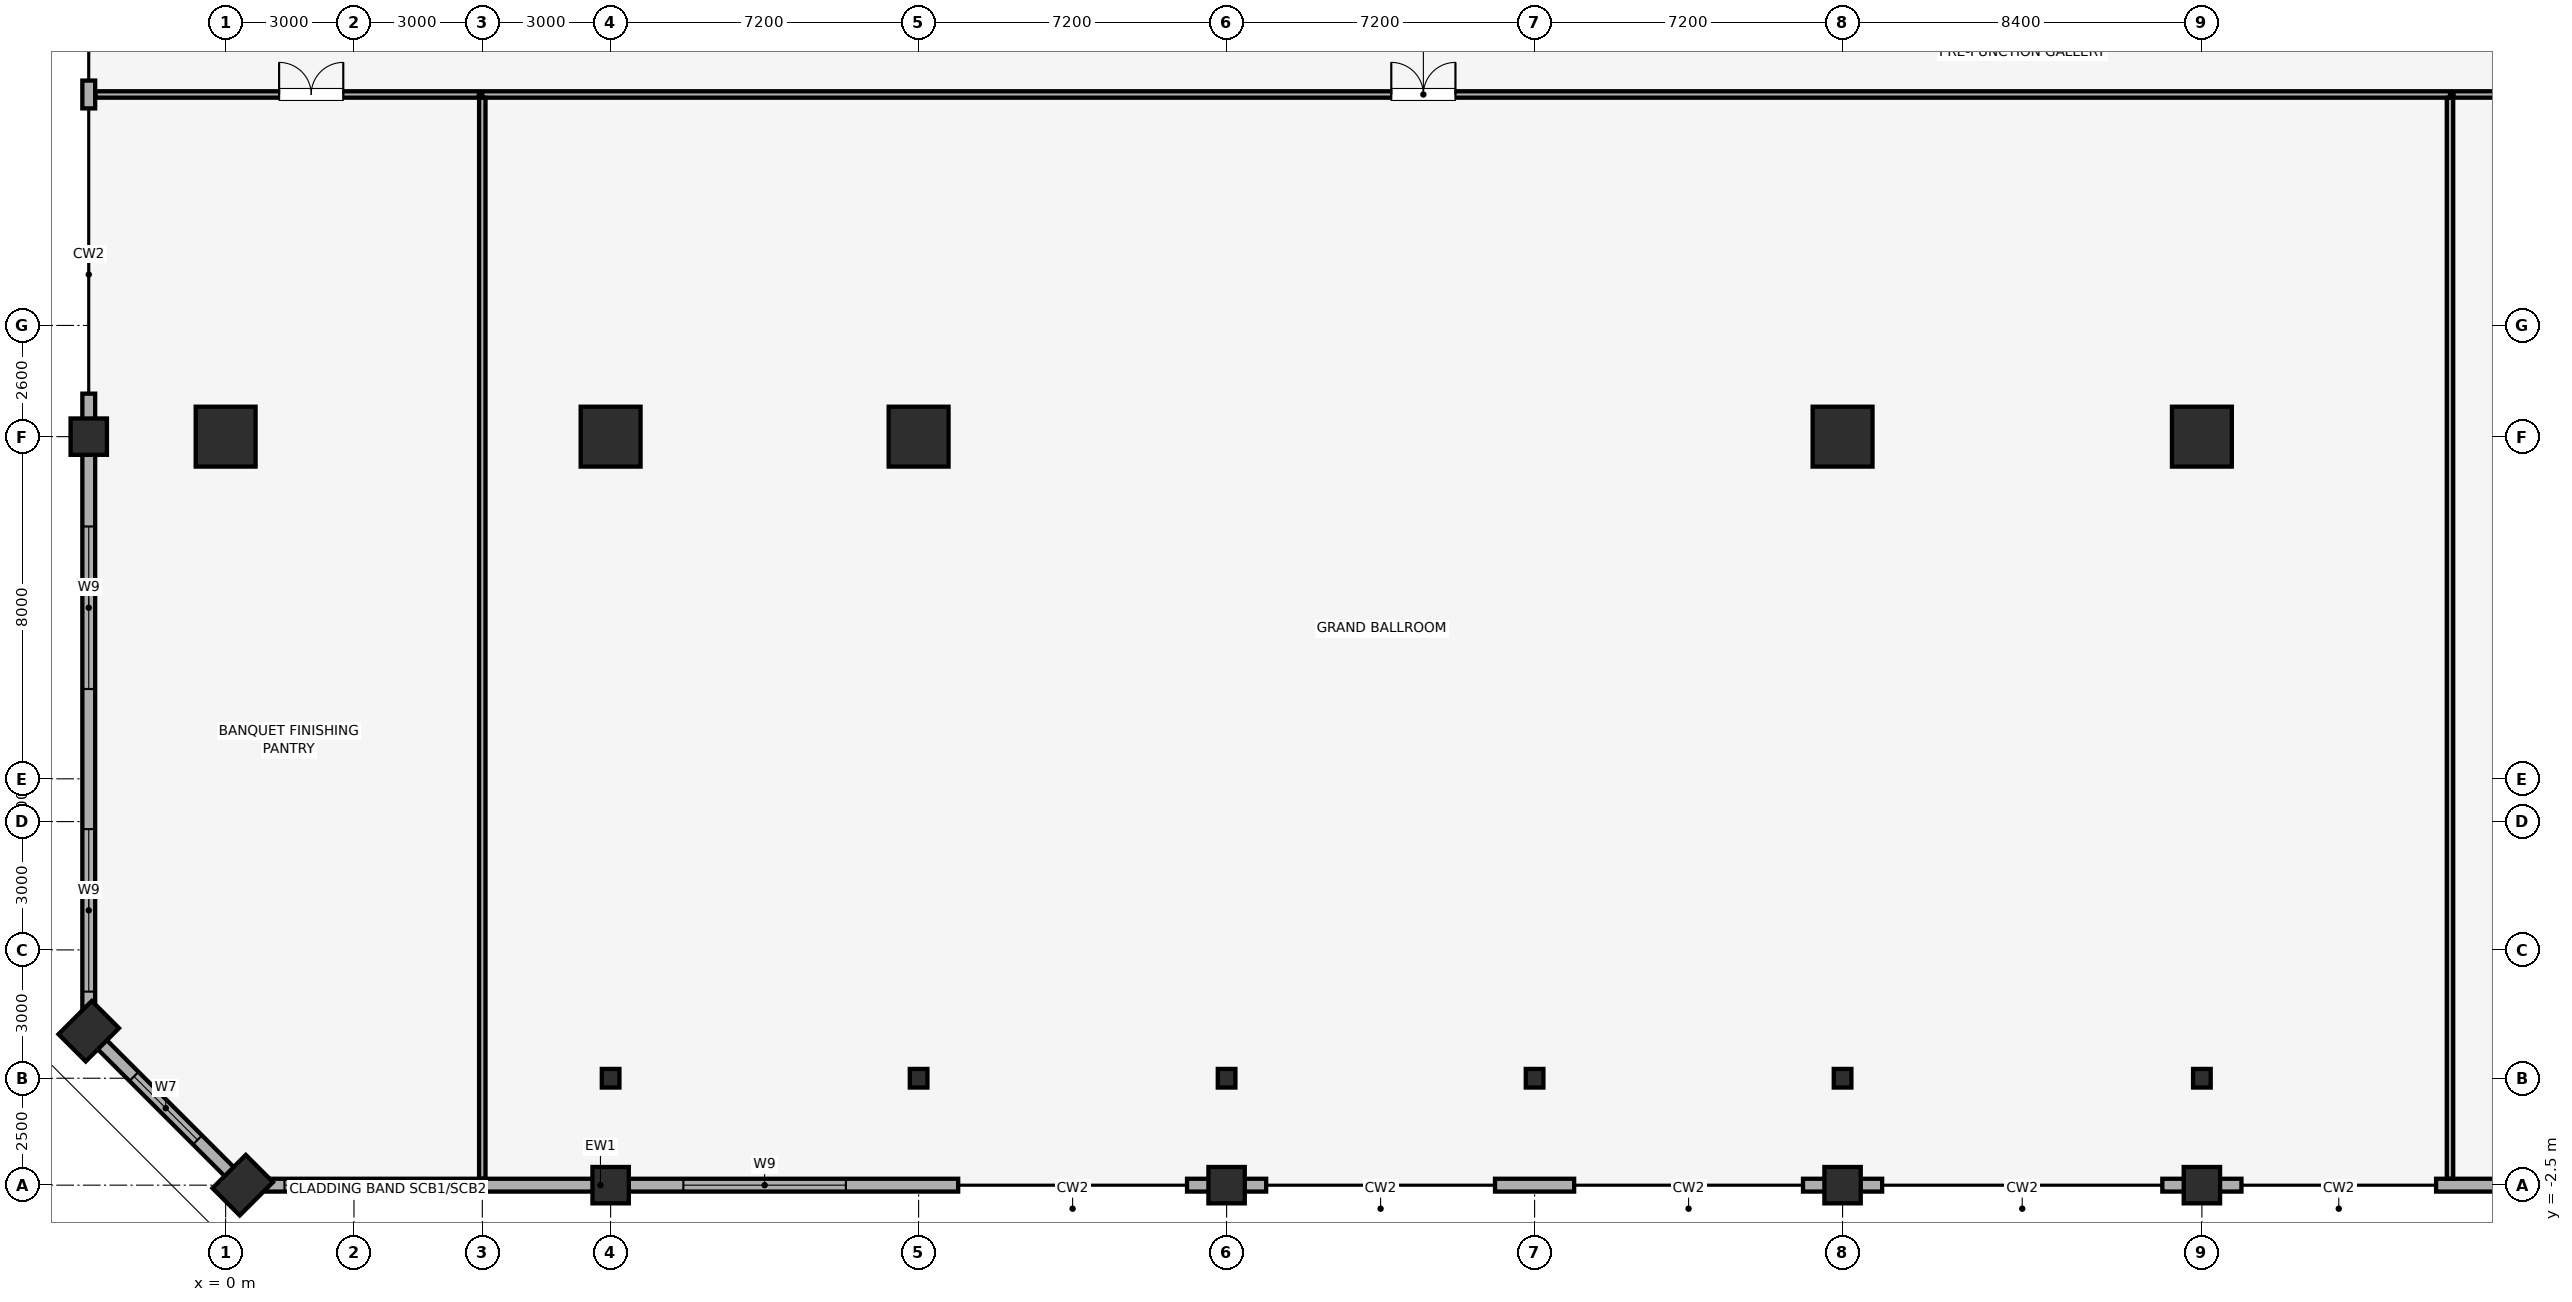
"""IFC4 building model, lengths in metres.
Left out: names, types, materials, properties, quantities, classifications, styles, units other than length and angle.
Written with IfcOpenShell. Run it as: python <this file> out.ifc"""

import sys

from ifc_helpers import new_model, si_unit, direction, frame, frame_2d, origin, origin_2d, place, context, subcontext, project, spatial, rectangle, i_section, extrude, element, fill, save


model = new_model("IFC4")
c1 = context("Model", 3, precision=1e-05, world=origin(), true_north=direction((0.0, 1.0)))
c2 = subcontext(c1, "Body", "Model", "MODEL_VIEW")
j1 = project(units=[si_unit("LENGTHUNIT", "METRE"), si_unit("PLANEANGLEUNIT", "RADIAN")], contexts=[c1])
p1 = place(None, origin())
s1 = spatial("IfcSite", under=j1, at=p1, CompositionType="ELEMENT")
p2 = place(p1, origin())
s2 = spatial("IfcBuilding", under=s1, at=p2, CompositionType="ELEMENT")
p3 = place(p2, frame((0.0, 0.0, 19.4)))
s3 = spatial("IfcBuildingStorey", under=s2, at=p3, CompositionType="ELEMENT", Elevation=19.4)
for number, where, z_axis, x_axis in (
    (1, (9.0, -2.5, 0.0), (0.0, 0.0, 1.0), (1.0, 0.0, 0.0)),
    (2, (23.4, -2.5, 0.0), (0.0, 0.0, 1.0), (1.0, 0.0, 0.0)),
    (3, (37.8, -2.5, 0.0), (0.0, 0.0, 1.0), (1.0, 0.0, 0.0)),
    (4, (46.2, -2.5, 0.0), (0.0, 0.0, 1.0), (1.0, 0.0, 0.0)),
    (5, (-3.2, 15.0, 0.0), (0.0, 0.0, 1.0), (1.0, 0.0, 0.0)),
):
    element("IfcColumn", number, at=place(p3, frame(where, z_axis=z_axis, x_axis=x_axis)), inside=s3, PredefinedType="COLUMN", context=c2, shape_type="SweptSolid", body=[
        extrude(rectangle(XDim=0.85, YDim=0.85, at=origin_2d()), origin(), (0.0, 0.0, 1.0), 6.28),
    ])
for number, where, z_axis, x_axis in (
    (6, (0.4, -2.5, 0.0), (0.0, 0.0, 1.0), (0.707, 0.707, 0.0)),
    (7, (-3.2, 1.1, 0.0), (0.0, 0.0, 1.0), (0.707, 0.707, 0.0)),
):
    element("IfcColumn", number, at=place(p3, frame(where, z_axis=z_axis, x_axis=x_axis)), inside=s3, PredefinedType="PILASTER", context=c2, shape_type="SweptSolid", body=[
        extrude(rectangle(XDim=1.1, YDim=0.9, at=origin_2d()), origin(), (0.0, 0.0, 1.0), 6.28),
    ])
for number, where, z_axis, x_axis in (
    (8, (9.0, 0.0, 0.0), (0.0, 0.0, 1.0), (1.0, 0.0, 0.0)),
    (9, (16.2, 0.0, 0.0), (0.0, 0.0, 1.0), (1.0, 0.0, 0.0)),
    (10, (23.4, 0.0, 0.0), (0.0, 0.0, 1.0), (1.0, 0.0, 0.0)),
    (11, (30.6, 0.0, 0.0), (0.0, 0.0, 1.0), (1.0, 0.0, 0.0)),
    (12, (37.8, 0.0, 0.0), (0.0, 0.0, 1.0), (1.0, 0.0, 0.0)),
    (13, (46.2, 0.0, 0.0), (0.0, 0.0, 1.0), (1.0, 0.0, 0.0)),
):
    element("IfcColumn", number, at=place(p3, frame(where, z_axis=z_axis, x_axis=x_axis)), inside=s3, PredefinedType="COLUMN", context=c2, shape_type="SweptSolid", body=[
        extrude(i_section(OverallWidth=0.412, OverallDepth=0.435, WebThickness=0.036, FlangeThickness=0.056, FilletRadius=0.015, at=origin_2d()), origin(), (0.0, 0.0, 1.0), 6.28),
    ])
for number, where, z_axis, x_axis in (
    (14, (9.0, 15.0, 0.0), (0.0, 0.0, 1.0), (1.0, 0.0, 0.0)),
    (15, (37.8, 15.0, 0.0), (0.0, 0.0, 1.0), (1.0, 0.0, 0.0)),
    (16, (46.2, 15.0, 0.0), (0.0, 0.0, 1.0), (1.0, 0.0, 0.0)),
    (17, (16.2, 15.0, 0.0), (0.0, 0.0, 1.0), (1.0, 0.0, 0.0)),
    (18, (0.0, 15.0, 0.0), (0.0, 0.0, 1.0), (1.0, 0.0, 0.0)),
):
    element("IfcColumn", number, at=place(p3, frame(where, z_axis=z_axis, x_axis=x_axis)), inside=s3, PredefinedType="COLUMN", context=c2, shape_type="SweptSolid", body=[
        extrude(rectangle(XDim=1.4, YDim=1.4, at=origin_2d()), origin(), (0.0, 0.0, 1.0), 6.28),
    ])
p4 = place(p3, frame((0.4, -2.5, 0.0), z_axis=(0.0, 0.0, 1.0), x_axis=(1.0, 0.0, 0.0)))
e19 = element("IfcWall", 19, at=p4, inside=s3, PredefinedType="SOLIDWALL", context=c2, shape_type="SweptSolid", body=[
    extrude(rectangle(XDim=16.725, YDim=0.3, at=frame_2d((8.363, 0.0))), origin(), (0.0, 0.0, 1.0), 5.33),
])
p5 = place(p4, frame((0.975, 0.0, 0.85)))
e20 = element("IfcOpeningElement", 20, at=p5, cuts=e19, PredefinedType="OPENING", context=c2, shape_type="SweptSolid", body=[
    extrude(rectangle(XDim=3.8, YDim=2.2, at=frame_2d((1.9, 1.1))), frame((0.0, 0.16, 0.0), z_axis=(0.0, -1.0, 0.0), x_axis=(1.0, 0.0, 0.0)), (0.0, 0.0, 1.0), 0.32),
])
p6 = place(p4, frame((10.3, 0.0, 0.85)))
e21 = element("IfcOpeningElement", 21, at=p6, cuts=e19, PredefinedType="OPENING", context=c2, shape_type="SweptSolid", body=[
    extrude(rectangle(XDim=3.8, YDim=2.2, at=frame_2d((1.9, 1.1))), frame((0.0, 0.16, 0.0), z_axis=(0.0, -1.0, 0.0), x_axis=(1.0, 0.0, 0.0)), (0.0, 0.0, 1.0), 0.32),
])
for number, where, z_axis, x_axis in (
    (22, (22.475, -2.5, 0.0), (0.0, 0.0, 1.0), (1.0, 0.0, 0.0)),
    (23, (29.675, -2.5, 0.0), (0.0, 0.0, 1.0), (1.0, 0.0, 0.0)),
):
    element("IfcWall", number, at=place(p3, frame(where, z_axis=z_axis, x_axis=x_axis)), inside=s3, PredefinedType="SOLIDWALL", context=c2, shape_type="SweptSolid", body=[
        extrude(rectangle(XDim=1.85, YDim=0.3, at=frame_2d((0.925, 0.0))), origin(), (0.0, 0.0, 1.0), 5.33),
    ])
for number, where, z_axis, x_axis in (
    (24, (36.875, -2.5, 0.0), (0.0, 0.0, 1.0), (1.0, 0.0, 0.0)),
    (25, (45.275, -2.5, 0.0), (0.0, 0.0, 1.0), (1.0, 0.0, 0.0)),
):
    element("IfcWall", number, at=place(p3, frame(where, z_axis=z_axis, x_axis=x_axis)), inside=s3, PredefinedType="SOLIDWALL", context=c2, shape_type="SweptSolid", body=[
        extrude(rectangle(XDim=1.85, YDim=0.3, at=frame_2d((0.925, 0.0))), origin(), (0.0, 0.0, 1.0), 5.33),
    ])
p7 = place(p3, frame((51.675, -2.5, 0.0), z_axis=(0.0, 0.0, 1.0), x_axis=(1.0, 0.0, 0.0)))
e26 = element("IfcWall", 26, at=p7, inside=s3, PredefinedType="SOLIDWALL", context=c2, shape_type="SweptSolid", body=[
    extrude(rectangle(XDim=2.65, YDim=0.3, at=frame_2d((1.325, 0.0))), origin(), (0.0, 0.0, 1.0), 5.33),
])
p8 = place(p3, frame((-3.2, 23.325, 0.0), z_axis=(0.0, 0.0, 1.0), x_axis=(0.0, -1.0, 0.0)))
e27 = element("IfcWall", 27, at=p8, inside=s3, PredefinedType="SOLIDWALL", context=c2, shape_type="SweptSolid", body=[
    extrude(rectangle(XDim=0.65, YDim=0.3, at=frame_2d((0.325, 0.0))), origin(), (0.0, 0.0, 1.0), 5.33),
])
p9 = place(p3, frame((-3.2, 16.005, 0.0), z_axis=(0.0, 0.0, 1.0), x_axis=(0.0, -1.0, 0.0)))
e28 = element("IfcWall", 28, at=p9, inside=s3, PredefinedType="SOLIDWALL", context=c2, shape_type="SweptSolid", body=[
    extrude(rectangle(XDim=14.905, YDim=0.3, at=frame_2d((7.452, 0.0))), origin(), (0.0, 0.0, 1.0), 5.33),
])
p10 = place(p9, frame((10.18, 0.0, 0.85)))
e29 = element("IfcOpeningElement", 29, at=p10, cuts=e28, PredefinedType="OPENING", context=c2, shape_type="SweptSolid", body=[
    extrude(rectangle(XDim=3.8, YDim=2.2, at=frame_2d((1.9, 1.1))), frame((0.0, 0.16, 0.0), z_axis=(0.0, -1.0, 0.0), x_axis=(1.0, 0.0, 0.0)), (0.0, 0.0, 1.0), 0.32),
])
p11 = place(p9, frame((3.105, 0.0, 0.85)))
e30 = element("IfcOpeningElement", 30, at=p11, cuts=e28, PredefinedType="OPENING", context=c2, shape_type="SweptSolid", body=[
    extrude(rectangle(XDim=3.8, YDim=2.2, at=frame_2d((1.9, 1.1))), frame((0.0, 0.16, 0.0), z_axis=(0.0, -1.0, 0.0), x_axis=(1.0, 0.0, 0.0)), (0.0, 0.0, 1.0), 0.32),
])
p12 = place(p3, frame((-3.2, 1.1, 0.0), z_axis=(0.0, 0.0, 1.0), x_axis=(0.707082803744, -0.707130757816, 0.0)))
e31 = element("IfcWall", 31, at=p12, inside=s3, PredefinedType="SOLIDWALL", context=c2, shape_type="SweptSolid", body=[
    extrude(rectangle(XDim=5.091, YDim=0.3, at=frame_2d((2.545, 0.0))), origin(), (0.0, 0.0, 1.0), 5.33),
])
p13 = place(p12, frame((1.496, 0.0, 0.85)))
e32 = element("IfcOpeningElement", 32, at=p13, cuts=e31, PredefinedType="OPENING", context=c2, shape_type="SweptSolid", body=[
    extrude(rectangle(XDim=2.1, YDim=1.6, at=frame_2d((1.05, 0.8))), frame((0.0, 0.16, 0.0), z_axis=(0.0, -1.0, 0.0), x_axis=(1.0, 0.0, 0.0)), (0.0, 0.0, 1.0), 0.32),
])
p14 = place(p3, frame((6.0, 23.0, 0.0), z_axis=(0.0, 0.0, 1.0), x_axis=(1.0, 0.0, 0.0)))
e33 = element("IfcWall", 33, at=p14, inside=s3, PredefinedType="PARTITIONING", context=c2, shape_type="SweptSolid", body=[
    extrude(rectangle(XDim=46.0, YDim=0.15, at=frame_2d((23.0, 0.0))), origin(), (0.0, 0.0, 1.0), 6.28),
])
p15 = place(p14, frame((21.25, 0.0, 0.0)))
e34 = element("IfcOpeningElement", 34, at=p15, cuts=e33, PredefinedType="OPENING", context=c2, shape_type="SweptSolid", body=[
    extrude(rectangle(XDim=1.5, YDim=2.25, at=frame_2d((0.75, 1.125))), frame((0.0, 0.085, 0.0), z_axis=(0.0, -1.0, 0.0), x_axis=(1.0, 0.0, 0.0)), (0.0, 0.0, 1.0), 0.17),
])
for number, where, z_axis, x_axis in (
    (35, (6.0, -2.345, 0.0), (0.0, 0.0, 1.0), (0.0, 1.0, 0.0)),
    (36, (52.0, -2.345, 0.0), (0.0, 0.0, 1.0), (0.0, 1.0, 0.0)),
):
    element("IfcWall", number, at=place(p3, frame(where, z_axis=z_axis, x_axis=x_axis)), inside=s3, PredefinedType="PARTITIONING", context=c2, shape_type="SweptSolid", body=[
        extrude(rectangle(XDim=25.265, YDim=0.15, at=frame_2d((12.632, 0.0))), origin(), (0.0, 0.0, 1.0), 6.28),
    ])
p16 = place(p3, frame((52.08, 23.0, 0.0), z_axis=(0.0, 0.0, 1.0), x_axis=(1.0, 0.0, 0.0)))
e37 = element("IfcWall", 37, at=p16, inside=s3, PredefinedType="PARTITIONING", context=c2, shape_type="SweptSolid", body=[
    extrude(rectangle(XDim=25.92, YDim=0.15, at=frame_2d((12.96, 0.0))), origin(), (0.0, 0.0, 1.0), 6.28),
])
p17 = place(p16, frame((11.17, 0.0, 0.0)))
e38 = element("IfcOpeningElement", 38, at=p17, cuts=e37, PredefinedType="OPENING", context=c2, shape_type="SweptSolid", body=[
    extrude(rectangle(XDim=1.5, YDim=2.25, at=frame_2d((0.75, 1.125))), frame((0.0, 0.085, 0.0), z_axis=(0.0, -1.0, 0.0), x_axis=(1.0, 0.0, 0.0)), (0.0, 0.0, 1.0), 0.17),
])
p18 = place(p3, frame((-3.045, 23.0, 0.0), z_axis=(0.0, 0.0, 1.0), x_axis=(1.0, 0.0, 0.0)))
e39 = element("IfcWall", 39, at=p18, inside=s3, PredefinedType="PARTITIONING", context=c2, shape_type="SweptSolid", body=[
    extrude(rectangle(XDim=8.965, YDim=0.15, at=frame_2d((4.482, 0.0))), origin(), (0.0, 0.0, 1.0), 6.28),
])
p19 = place(p18, frame((4.295, 0.0, 0.0)))
e40 = element("IfcOpeningElement", 40, at=p19, cuts=e39, PredefinedType="OPENING", context=c2, shape_type="SweptSolid", body=[
    extrude(rectangle(XDim=1.5, YDim=2.25, at=frame_2d((0.75, 1.125))), frame((0.0, 0.085, 0.0), z_axis=(0.0, -1.0, 0.0), x_axis=(1.0, 0.0, 0.0)), (0.0, 0.0, 1.0), 0.17),
])
p20 = place(p13, origin())
e41 = element("IfcWindow", 41, at=p20, inside=s3, PartitioningType="SINGLE_PANEL", PredefinedType="WINDOW", context=c2, shape_type="SweptSolid", body=[
    extrude(rectangle(XDim=2.1, YDim=1.6, at=frame_2d((1.05, 0.8))), frame((0.0, 0.03, 0.0), z_axis=(0.0, -1.0, 0.0), x_axis=(1.0, 0.0, 0.0)), (0.0, 0.0, 1.0), 0.06),
])
fill(e32, e41)
p21 = place(p5, origin())
e42 = element("IfcWindow", 42, at=p21, inside=s3, PartitioningType="SINGLE_PANEL", PredefinedType="WINDOW", context=c2, shape_type="SweptSolid", body=[
    extrude(rectangle(XDim=3.8, YDim=2.2, at=frame_2d((1.9, 1.1))), frame((0.0, 0.03, 0.0), z_axis=(0.0, -1.0, 0.0), x_axis=(1.0, 0.0, 0.0)), (0.0, 0.0, 1.0), 0.06),
])
fill(e20, e42)
p22 = place(p6, origin())
e43 = element("IfcWindow", 43, at=p22, inside=s3, PartitioningType="SINGLE_PANEL", PredefinedType="WINDOW", context=c2, shape_type="SweptSolid", body=[
    extrude(rectangle(XDim=3.8, YDim=2.2, at=frame_2d((1.9, 1.1))), frame((0.0, 0.03, 0.0), z_axis=(0.0, -1.0, 0.0), x_axis=(1.0, 0.0, 0.0)), (0.0, 0.0, 1.0), 0.06),
])
fill(e21, e43)
p23 = place(p10, origin())
e44 = element("IfcWindow", 44, at=p23, inside=s3, PartitioningType="SINGLE_PANEL", PredefinedType="WINDOW", context=c2, shape_type="SweptSolid", body=[
    extrude(rectangle(XDim=3.8, YDim=2.2, at=frame_2d((1.9, 1.1))), frame((0.0, 0.03, 0.0), z_axis=(0.0, -1.0, 0.0), x_axis=(1.0, 0.0, 0.0)), (0.0, 0.0, 1.0), 0.06),
])
fill(e29, e44)
p24 = place(p11, origin())
e45 = element("IfcWindow", 45, at=p24, inside=s3, PartitioningType="SINGLE_PANEL", PredefinedType="WINDOW", context=c2, shape_type="SweptSolid", body=[
    extrude(rectangle(XDim=3.8, YDim=2.2, at=frame_2d((1.9, 1.1))), frame((0.0, 0.03, 0.0), z_axis=(0.0, -1.0, 0.0), x_axis=(1.0, 0.0, 0.0)), (0.0, 0.0, 1.0), 0.06),
])
fill(e30, e45)
p25 = place(p15, origin())
e46 = element("IfcDoor", 46, at=p25, inside=s3, OperationType="DOUBLE_DOOR_SINGLE_SWING", PredefinedType="DOOR", context=c2, shape_type="SweptSolid", body=[
    extrude(rectangle(XDim=1.5, YDim=2.25, at=frame_2d((0.75, 1.125))), frame((0.0, 0.025, 0.0), z_axis=(0.0, -1.0, 0.0), x_axis=(1.0, 0.0, 0.0)), (0.0, 0.0, 1.0), 0.05),
])
fill(e34, e46)
p26 = place(p19, origin())
e47 = element("IfcDoor", 47, at=p26, inside=s3, OperationType="DOUBLE_DOOR_SINGLE_SWING", PredefinedType="DOOR", context=c2, shape_type="SweptSolid", body=[
    extrude(rectangle(XDim=1.5, YDim=2.25, at=frame_2d((0.75, 1.125))), frame((0.0, 0.025, 0.0), z_axis=(0.0, -1.0, 0.0), x_axis=(1.0, 0.0, 0.0)), (0.0, 0.0, 1.0), 0.05),
])
fill(e40, e47)
save(model, sys.argv[1])
